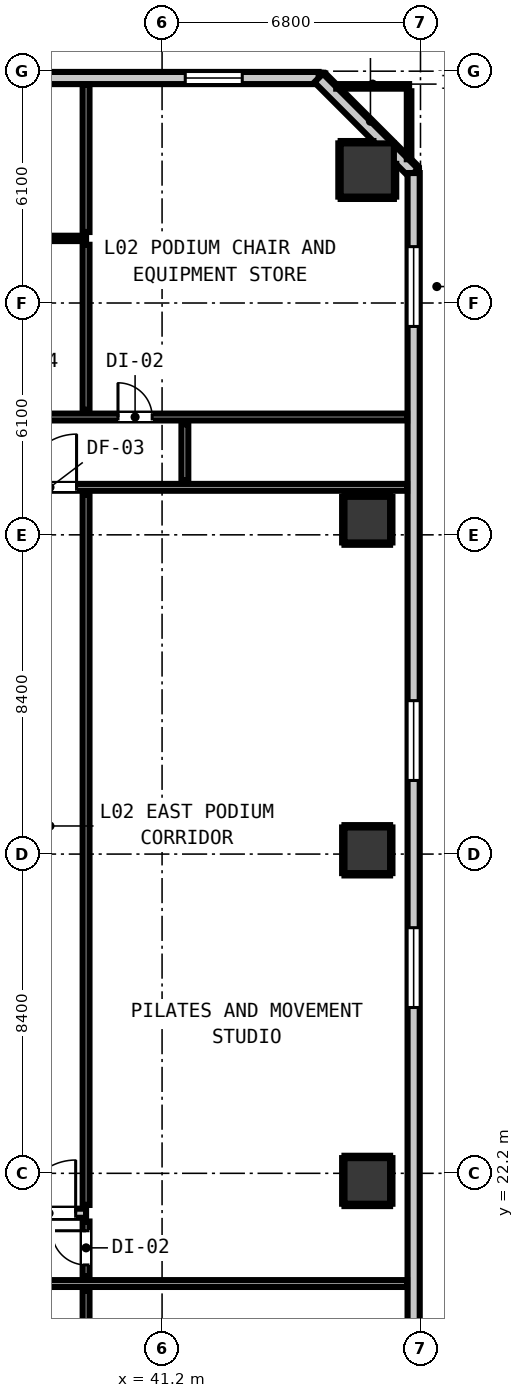
"""IFC4 building model, lengths in metres.
Left out: names, types, materials, properties, quantities, classifications, styles, units other than length and angle.
Written with IfcOpenShell. Run it as: python <this file> out.ifc"""

import sys

from ifc_helpers import new_model, si_unit, direction, frame, frame_2d, origin, origin_2d, place, context, subcontext, project, spatial, rectangle, circle, extrude, element, fill, save


model = new_model("IFC4")
c1 = context("Model", 3, precision=1e-05, world=origin(), true_north=direction((0.0, 1.0)))
c2 = subcontext(c1, "Body", "Model", "MODEL_VIEW")
j1 = project(units=[si_unit("LENGTHUNIT", "METRE"), si_unit("PLANEANGLEUNIT", "RADIAN")], contexts=[c1])
p1 = place(None, origin())
s1 = spatial("IfcSite", under=j1, at=p1, CompositionType="ELEMENT")
p2 = place(p1, origin())
s2 = spatial("IfcBuilding", under=s1, at=p2, CompositionType="ELEMENT")
p3 = place(p2, frame((0.0, 0.0, 9.4)))
s3 = spatial("IfcBuildingStorey", under=s2, at=p3, CompositionType="ELEMENT", Elevation=9.4)
for number, where, z_axis, x_axis in (
    (1, (46.6, 22.0, 0.0), (0.0, 0.0, 1.0), (1.0, 0.0, 0.0)),
    (2, (46.6, 30.7, 0.0), (0.0, 0.0, 1.0), (1.0, 0.0, 0.0)),
    (3, (46.6, 39.4, 0.0), (0.0, 0.0, 1.0), (1.0, 0.0, 0.0)),
):
    element("IfcColumn", number, at=place(p3, frame(where, z_axis=z_axis, x_axis=x_axis)), inside=s3, PredefinedType="COLUMN", context=c2, shape_type="SweptSolid", body=[
        extrude(circle(Radius=0.6, at=origin_2d()), origin(), (0.0, 0.0, 1.0), 4.2),
    ])
p4 = place(p3, frame((46.6, 48.6, 0.0), z_axis=(0.0, 0.0, 1.0), x_axis=(1.0, 0.0, 0.0)))
e4 = element("IfcColumn", 4, at=p4, inside=s3, PredefinedType="COLUMN", context=c2, shape_type="SweptSolid", body=[
    extrude(rectangle(XDim=1.4, YDim=1.4, at=origin_2d()), origin(), (0.0, 0.0, 1.0), 4.2),
])
p5 = place(p3, frame((6.68, 51.02, 0.0), z_axis=(0.0, 0.0, 1.0), x_axis=(1.0, 0.0, 0.0)))
e5 = element("IfcWall", 5, at=p5, inside=s3, PredefinedType="STANDARD", context=c2, shape_type="SweptSolid", body=[
    extrude(rectangle(XDim=38.64, YDim=0.32, at=frame_2d((19.32, 0.0))), origin(), (0.0, 0.0, 1.0), 3.92),
])
p6 = place(p5, frame((18.57, 0.0, 0.9)))
e6 = element("IfcOpeningElement", 6, at=p6, cuts=e5, PredefinedType="OPENING", context=c2, shape_type="SweptSolid", body=[
    extrude(rectangle(XDim=1.5, YDim=1.8, at=frame_2d((0.75, 0.9))), frame((0.0, 0.17, 0.0), z_axis=(0.0, -1.0, 0.0), x_axis=(1.0, 0.0, 0.0)), (0.0, 0.0, 1.0), 0.34),
])
p7 = place(p5, frame((24.09, 0.0, 0.9)))
e7 = element("IfcOpeningElement", 7, at=p7, cuts=e5, PredefinedType="OPENING", context=c2, shape_type="SweptSolid", body=[
    extrude(rectangle(XDim=1.5, YDim=1.8, at=frame_2d((0.75, 0.9))), frame((0.0, 0.17, 0.0), z_axis=(0.0, -1.0, 0.0), x_axis=(1.0, 0.0, 0.0)), (0.0, 0.0, 1.0), 0.34),
])
p8 = place(p5, frame((35.13, 0.0, 0.9)))
e8 = element("IfcOpeningElement", 8, at=p8, cuts=e5, PredefinedType="OPENING", context=c2, shape_type="SweptSolid", body=[
    extrude(rectangle(XDim=1.5, YDim=1.8, at=frame_2d((0.75, 0.9))), frame((0.0, 0.17, 0.0), z_axis=(0.0, -1.0, 0.0), x_axis=(1.0, 0.0, 0.0)), (0.0, 0.0, 1.0), 0.34),
])
p9 = place(p3, frame((45.32, 51.02, 0.0), z_axis=(0.0, 0.0, 1.0), x_axis=(0.707106781187, -0.707106781187, 0.0)))
e9 = element("IfcWall", 9, at=p9, inside=s3, PredefinedType="STANDARD", context=c2, shape_type="SweptSolid", body=[
    extrude(rectangle(XDim=3.536, YDim=0.32, at=frame_2d((1.768, 0.0))), origin(), (0.0, 0.0, 1.0), 3.92),
])
p10 = place(p3, frame((47.82, 48.52, 0.0), z_axis=(0.0, 0.0, 1.0), x_axis=(0.0, -1.0, 0.0)))
e10 = element("IfcWall", 10, at=p10, inside=s3, PredefinedType="STANDARD", context=c2, shape_type="SweptSolid", body=[
    extrude(rectangle(XDim=35.84, YDim=0.32, at=frame_2d((17.92, 0.0))), origin(), (0.0, 0.0, 1.0), 3.92),
])
p11 = place(p10, frame((1.937, 0.0, 0.9)))
e11 = element("IfcOpeningElement", 11, at=p11, cuts=e10, PredefinedType="OPENING", context=c2, shape_type="SweptSolid", body=[
    extrude(rectangle(XDim=2.1, YDim=1.9, at=frame_2d((1.05, 0.95))), frame((0.0, 0.17, 0.0), z_axis=(0.0, -1.0, 0.0), x_axis=(1.0, 0.0, 0.0)), (0.0, 0.0, 1.0), 0.34),
])
p12 = place(p10, frame((13.883, 0.0, 0.9)))
e12 = element("IfcOpeningElement", 12, at=p12, cuts=e10, PredefinedType="OPENING", context=c2, shape_type="SweptSolid", body=[
    extrude(rectangle(XDim=2.1, YDim=1.9, at=frame_2d((1.05, 0.95))), frame((0.0, 0.17, 0.0), z_axis=(0.0, -1.0, 0.0), x_axis=(1.0, 0.0, 0.0)), (0.0, 0.0, 1.0), 0.34),
])
p13 = place(p10, frame((19.857, 0.0, 0.9)))
e13 = element("IfcOpeningElement", 13, at=p13, cuts=e10, PredefinedType="OPENING", context=c2, shape_type="SweptSolid", body=[
    extrude(rectangle(XDim=2.1, YDim=1.9, at=frame_2d((1.05, 0.95))), frame((0.0, 0.17, 0.0), z_axis=(0.0, -1.0, 0.0), x_axis=(1.0, 0.0, 0.0)), (0.0, 0.0, 1.0), 0.34),
])
p14 = place(p10, frame((31.803, 0.0, 0.9)))
e14 = element("IfcOpeningElement", 14, at=p14, cuts=e10, PredefinedType="OPENING", context=c2, shape_type="SweptSolid", body=[
    extrude(rectangle(XDim=2.1, YDim=1.9, at=frame_2d((1.05, 0.95))), frame((0.0, 0.17, 0.0), z_axis=(0.0, -1.0, 0.0), x_axis=(1.0, 0.0, 0.0)), (0.0, 0.0, 1.0), 0.34),
])
p15 = place(p3, frame((10.5, 21.15, 0.0), z_axis=(0.0, 0.0, 1.0), x_axis=(1.0, 0.0, 0.0)))
e15 = element("IfcWall", 15, at=p15, inside=s3, PredefinedType="PARTITIONING", context=c2, shape_type="SweptSolid", body=[
    extrude(rectangle(XDim=28.7, YDim=0.24, at=frame_2d((14.35, 0.0))), origin(), (0.0, 0.0, 1.0), 3.92),
])
p16 = place(p15, frame((7.71, 0.0, 0.0)))
e16 = element("IfcOpeningElement", 16, at=p16, cuts=e15, PredefinedType="OPENING", context=c2, shape_type="SweptSolid", body=[
    extrude(rectangle(XDim=1.1, YDim=2.15, at=frame_2d((0.55, 1.075))), frame((0.0, 0.13, 0.0), z_axis=(0.0, -1.0, 0.0), x_axis=(1.0, 0.0, 0.0)), (0.0, 0.0, 1.0), 0.26),
])
p17 = place(p15, frame((0.324, 0.0, 0.0)))
e17 = element("IfcOpeningElement", 17, at=p17, cuts=e15, PredefinedType="OPENING", context=c2, shape_type="SweptSolid", body=[
    extrude(rectangle(XDim=1.4, YDim=2.15, at=frame_2d((0.7, 1.075))), frame((0.0, 0.13, 0.0), z_axis=(0.0, -1.0, 0.0), x_axis=(1.0, 0.0, 0.0)), (0.0, 0.0, 1.0), 0.26),
])
p18 = place(p15, frame((27.026, 0.0, 0.0)))
e18 = element("IfcOpeningElement", 18, at=p18, cuts=e15, PredefinedType="OPENING", context=c2, shape_type="SweptSolid", body=[
    extrude(rectangle(XDim=1.4, YDim=2.15, at=frame_2d((0.7, 1.075))), frame((0.0, 0.13, 0.0), z_axis=(0.0, -1.0, 0.0), x_axis=(1.0, 0.0, 0.0)), (0.0, 0.0, 1.0), 0.26),
])
p19 = place(p3, frame((4.352, 19.3, 0.0), z_axis=(0.0, 0.0, 1.0), x_axis=(1.0, 0.0, 0.0)))
e19 = element("IfcWall", 19, at=p19, inside=s3, PredefinedType="PARTITIONING", context=c2, shape_type="SweptSolid", body=[
    extrude(rectangle(XDim=43.296, YDim=0.18, at=frame_2d((21.648, 0.0))), origin(), (0.0, 0.0, 1.0), 3.92),
])
p20 = place(p19, frame((12.248, 0.0, 0.0)))
e20 = element("IfcOpeningElement", 20, at=p20, cuts=e19, PredefinedType="OPENING", context=c2, shape_type="SweptSolid", body=[
    extrude(rectangle(XDim=1.0, YDim=2.15, at=frame_2d((0.5, 1.075))), frame((0.0, 0.1, 0.0), z_axis=(0.0, -1.0, 0.0), x_axis=(1.0, 0.0, 0.0)), (0.0, 0.0, 1.0), 0.2),
])
p21 = place(p19, frame((27.998, 0.0, 0.0)))
e21 = element("IfcOpeningElement", 21, at=p21, cuts=e19, PredefinedType="OPENING", context=c2, shape_type="SweptSolid", body=[
    extrude(rectangle(XDim=1.0, YDim=2.15, at=frame_2d((0.5, 1.075))), frame((0.0, 0.1, 0.0), z_axis=(0.0, -1.0, 0.0), x_axis=(1.0, 0.0, 0.0)), (0.0, 0.0, 1.0), 0.2),
])
p22 = place(p3, frame((10.5, 40.25, 0.0), z_axis=(0.0, 0.0, 1.0), x_axis=(1.0, 0.0, 0.0)))
e22 = element("IfcWall", 22, at=p22, inside=s3, PredefinedType="PARTITIONING", context=c2, shape_type="SweptSolid", body=[
    extrude(rectangle(XDim=37.148, YDim=0.18, at=frame_2d((18.574, 0.0))), origin(), (0.0, 0.0, 1.0), 3.92),
])
p23 = place(p22, frame((6.935, 0.0, 0.0)))
e23 = element("IfcOpeningElement", 23, at=p23, cuts=e22, PredefinedType="OPENING", context=c2, shape_type="SweptSolid", body=[
    extrude(rectangle(XDim=1.4, YDim=2.15, at=frame_2d((0.7, 1.075))), frame((0.0, 0.1, 0.0), z_axis=(0.0, -1.0, 0.0), x_axis=(1.0, 0.0, 0.0)), (0.0, 0.0, 1.0), 0.2),
])
p24 = place(p22, frame((0.324, 0.0, 0.0)))
e24 = element("IfcOpeningElement", 24, at=p24, cuts=e22, PredefinedType="OPENING", context=c2, shape_type="SweptSolid", body=[
    extrude(rectangle(XDim=1.4, YDim=2.15, at=frame_2d((0.7, 1.075))), frame((0.0, 0.1, 0.0), z_axis=(0.0, -1.0, 0.0), x_axis=(1.0, 0.0, 0.0)), (0.0, 0.0, 1.0), 0.2),
])
p25 = place(p22, frame((27.05, 0.0, 0.0)))
e25 = element("IfcOpeningElement", 25, at=p25, cuts=e22, PredefinedType="OPENING", context=c2, shape_type="SweptSolid", body=[
    extrude(rectangle(XDim=1.4, YDim=2.15, at=frame_2d((0.7, 1.075))), frame((0.0, 0.1, 0.0), z_axis=(0.0, -1.0, 0.0), x_axis=(1.0, 0.0, 0.0)), (0.0, 0.0, 1.0), 0.2),
])
p26 = place(p3, frame((4.352, 42.1, 0.0), z_axis=(0.0, 0.0, 1.0), x_axis=(1.0, 0.0, 0.0)))
e26 = element("IfcWall", 26, at=p26, inside=s3, PredefinedType="PARTITIONING", context=c2, shape_type="SweptSolid", body=[
    extrude(rectangle(XDim=43.296, YDim=0.18, at=frame_2d((21.648, 0.0))), origin(), (0.0, 0.0, 1.0), 3.92),
])
p27 = place(p26, frame((14.472, 0.0, 0.0)))
e27 = element("IfcOpeningElement", 27, at=p27, cuts=e26, PredefinedType="OPENING", context=c2, shape_type="SweptSolid", body=[
    extrude(rectangle(XDim=0.9, YDim=2.1, at=frame_2d((0.45, 1.05))), frame((0.0, 0.1, 0.0), z_axis=(0.0, -1.0, 0.0), x_axis=(1.0, 0.0, 0.0)), (0.0, 0.0, 1.0), 0.2),
])
p28 = place(p26, frame((25.118, 0.0, 0.0)))
e28 = element("IfcOpeningElement", 28, at=p28, cuts=e26, PredefinedType="OPENING", context=c2, shape_type="SweptSolid", body=[
    extrude(rectangle(XDim=0.86, YDim=2.02, at=frame_2d((0.43, 1.01))), frame((0.0, 0.1, 0.0), z_axis=(0.0, -1.0, 0.0), x_axis=(1.0, 0.0, 0.0)), (0.0, 0.0, 1.0), 0.2),
])
p29 = place(p26, frame((29.218, 0.0, 0.0)))
e29 = element("IfcOpeningElement", 29, at=p29, cuts=e26, PredefinedType="OPENING", context=c2, shape_type="SweptSolid", body=[
    extrude(rectangle(XDim=0.86, YDim=2.02, at=frame_2d((0.43, 1.01))), frame((0.0, 0.1, 0.0), z_axis=(0.0, -1.0, 0.0), x_axis=(1.0, 0.0, 0.0)), (0.0, 0.0, 1.0), 0.2),
])
p30 = place(p26, frame((32.873, 0.0, 0.0)))
e30 = element("IfcOpeningElement", 30, at=p30, cuts=e26, PredefinedType="OPENING", context=c2, shape_type="SweptSolid", body=[
    extrude(rectangle(XDim=0.95, YDim=2.1, at=frame_2d((0.475, 1.05))), frame((0.0, 0.1, 0.0), z_axis=(0.0, -1.0, 0.0), x_axis=(1.0, 0.0, 0.0)), (0.0, 0.0, 1.0), 0.2),
])
p31 = place(p26, frame((35.688, 0.0, 0.0)))
e31 = element("IfcOpeningElement", 31, at=p31, cuts=e26, PredefinedType="OPENING", context=c2, shape_type="SweptSolid", body=[
    extrude(rectangle(XDim=0.9, YDim=2.1, at=frame_2d((0.45, 1.05))), frame((0.0, 0.1, 0.0), z_axis=(0.0, -1.0, 0.0), x_axis=(1.0, 0.0, 0.0)), (0.0, 0.0, 1.0), 0.2),
])
p32 = place(p3, frame((28.0, 46.8, 0.0), z_axis=(0.0, 0.0, 1.0), x_axis=(1.0, 0.0, 0.0)))
e32 = element("IfcWall", 32, at=p32, inside=s3, PredefinedType="PARTITIONING", context=c2, shape_type="SweptSolid", body=[
    extrude(rectangle(XDim=11.2, YDim=0.14, at=frame_2d((5.6, 0.0))), origin(), (0.0, 0.0, 1.0), 3.92),
])
p33 = place(p3, frame((45.783, 50.8, 0.0), z_axis=(0.0, 0.0, 1.0), x_axis=(1.0, 0.0, 0.0)))
e33 = element("IfcWall", 33, at=p33, inside=s3, PredefinedType="PARTITIONING", context=c2, shape_type="SweptSolid", body=[
    extrude(rectangle(XDim=1.917, YDim=0.12, at=frame_2d((0.958, 0.0))), origin(), (0.0, 0.0, 1.0), 3.92),
])
p34 = place(p3, frame((39.2, 12.258, 0.0), z_axis=(0.0, 0.0, 1.0), x_axis=(0.0, 1.0, 0.0)))
e34 = element("IfcWall", 34, at=p34, inside=s3, PredefinedType="PARTITIONING", context=c2, shape_type="SweptSolid", body=[
    extrude(rectangle(XDim=6.854, YDim=0.18, at=frame_2d((3.427, 0.0))), origin(), (0.0, 0.0, 1.0), 3.92),
])
p35 = place(p3, frame((39.2, 19.488, 0.0), z_axis=(0.0, 0.0, 1.0), x_axis=(0.0, 1.0, 0.0)))
e35 = element("IfcWall", 35, at=p35, inside=s3, PredefinedType="PARTITIONING", context=c2, shape_type="SweptSolid", body=[
    extrude(rectangle(XDim=1.444, YDim=0.18, at=frame_2d((0.722, 0.0))), origin(), (0.0, 0.0, 1.0), 3.92),
])
p36 = place(p35, frame((0.301, 0.0, 0.0)))
e36 = element("IfcOpeningElement", 36, at=p36, cuts=e35, PredefinedType="OPENING", context=c2, shape_type="SweptSolid", body=[
    extrude(rectangle(XDim=0.9, YDim=2.1, at=frame_2d((0.45, 1.05))), frame((0.0, 0.1, 0.0), z_axis=(0.0, -1.0, 0.0), x_axis=(1.0, 0.0, 0.0)), (0.0, 0.0, 1.0), 0.2),
])
p37 = place(p3, frame((39.2, 21.368, 0.0), z_axis=(0.0, 0.0, 1.0), x_axis=(0.0, 1.0, 0.0)))
e37 = element("IfcWall", 37, at=p37, inside=s3, PredefinedType="PARTITIONING", context=c2, shape_type="SweptSolid", body=[
    extrude(rectangle(XDim=18.694, YDim=0.18, at=frame_2d((9.347, 0.0))), origin(), (0.0, 0.0, 1.0), 3.92),
])
p38 = place(p3, frame((39.2, 42.288, 0.0), z_axis=(0.0, 0.0, 1.0), x_axis=(0.0, 1.0, 0.0)))
e38 = element("IfcWall", 38, at=p38, inside=s3, PredefinedType="PARTITIONING", context=c2, shape_type="SweptSolid", body=[
    extrude(rectangle(XDim=4.344, YDim=0.18, at=frame_2d((2.172, 0.0))), origin(), (0.0, 0.0, 1.0), 3.92),
])
p39 = place(p3, frame((39.2, 46.968, 0.0), z_axis=(0.0, 0.0, 1.0), x_axis=(0.0, 1.0, 0.0)))
e39 = element("IfcWall", 39, at=p39, inside=s3, PredefinedType="PARTITIONING", context=c2, shape_type="SweptSolid", body=[
    extrude(rectangle(XDim=3.88, YDim=0.18, at=frame_2d((1.94, 0.0))), origin(), (0.0, 0.0, 1.0), 3.92),
])
p40 = place(p3, frame((41.8, 40.438, 0.0), z_axis=(0.0, 0.0, 1.0), x_axis=(0.0, 1.0, 0.0)))
e40 = element("IfcWall", 40, at=p40, inside=s3, PredefinedType="PARTITIONING", context=c2, shape_type="SweptSolid", body=[
    extrude(rectangle(XDim=1.474, YDim=0.18, at=frame_2d((0.737, 0.0))), origin(), (0.0, 0.0, 1.0), 3.92),
])
p41 = place(p3, frame((47.7, 48.883, 0.0), z_axis=(0.0, 0.0, 1.0), x_axis=(0.0, 1.0, 0.0)))
e41 = element("IfcWall", 41, at=p41, inside=s3, PredefinedType="PARTITIONING", context=c2, shape_type="SweptSolid", body=[
    extrude(rectangle(XDim=1.789, YDim=0.12, at=frame_2d((0.895, 0.0))), origin(), (0.0, 0.0, 1.0), 3.92),
])
for number, where, z_axis, x_axis in (
    (42, (46.0, 21.368, 0.0), (0.0, 0.0, 1.0), (1.0, 0.0, 0.0)),
    (43, (46.0, 22.632, 0.0), (0.0, 0.0, 1.0), (1.0, 0.0, 0.0)),
):
    element("IfcWall", number, at=place(p3, frame(where, z_axis=z_axis, x_axis=x_axis)), inside=s3, PredefinedType="PARTITIONING", context=c2, shape_type="SweptSolid", body=[
        extrude(rectangle(XDim=1.2, YDim=0.06, at=frame_2d((0.6, 0.0))), origin(), (0.0, 0.0, 1.0), 1.45),
    ])
for number, where, z_axis, x_axis in (
    (44, (45.968, 21.4, 0.0), (0.0, 0.0, 1.0), (0.0, 1.0, 0.0)),
    (45, (47.232, 21.4, 0.0), (0.0, 0.0, 1.0), (0.0, 1.0, 0.0)),
):
    element("IfcWall", number, at=place(p3, frame(where, z_axis=z_axis, x_axis=x_axis)), inside=s3, PredefinedType="PARTITIONING", context=c2, shape_type="SweptSolid", body=[
        extrude(rectangle(XDim=1.2, YDim=0.06, at=frame_2d((0.6, 0.0))), origin(), (0.0, 0.0, 1.0), 1.45),
    ])
for number, where, z_axis, x_axis in (
    (46, (46.0, 30.068, 0.0), (0.0, 0.0, 1.0), (1.0, 0.0, 0.0)),
    (47, (46.0, 31.332, 0.0), (0.0, 0.0, 1.0), (1.0, 0.0, 0.0)),
    (48, (45.968, 30.1, 0.0), (0.0, 0.0, 1.0), (0.0, 1.0, 0.0)),
    (49, (47.232, 30.1, 0.0), (0.0, 0.0, 1.0), (0.0, 1.0, 0.0)),
    (50, (46.0, 38.768, 0.0), (0.0, 0.0, 1.0), (1.0, 0.0, 0.0)),
    (51, (46.0, 40.032, 0.0), (0.0, 0.0, 1.0), (1.0, 0.0, 0.0)),
    (52, (45.968, 38.8, 0.0), (0.0, 0.0, 1.0), (0.0, 1.0, 0.0)),
    (53, (47.232, 38.8, 0.0), (0.0, 0.0, 1.0), (0.0, 1.0, 0.0)),
):
    element("IfcWall", number, at=place(p3, frame(where, z_axis=z_axis, x_axis=x_axis)), inside=s3, PredefinedType="PARTITIONING", context=c2, shape_type="SweptSolid", body=[
        extrude(rectangle(XDim=1.2, YDim=0.06, at=frame_2d((0.6, 0.0))), origin(), (0.0, 0.0, 1.0), 1.45),
    ])
p42 = place(p3, frame((45.9, 47.868, 0.0), z_axis=(0.0, 0.0, 1.0), x_axis=(1.0, 0.0, 0.0)))
e54 = element("IfcWall", 54, at=p42, inside=s3, PredefinedType="PARTITIONING", context=c2, shape_type="SweptSolid", body=[
    extrude(rectangle(XDim=1.4, YDim=0.06, at=frame_2d((0.7, 0.0))), origin(), (0.0, 0.0, 1.0), 1.45),
])
p43 = place(p3, frame((45.9, 49.332, 0.0), z_axis=(0.0, 0.0, 1.0), x_axis=(1.0, 0.0, 0.0)))
e55 = element("IfcWall", 55, at=p43, inside=s3, PredefinedType="PARTITIONING", context=c2, shape_type="SweptSolid", body=[
    extrude(rectangle(XDim=0.861, YDim=0.06, at=frame_2d((0.431, 0.0))), origin(), (0.0, 0.0, 1.0), 1.45),
])
p44 = place(p3, frame((45.868, 47.9, 0.0), z_axis=(0.0, 0.0, 1.0), x_axis=(0.0, 1.0, 0.0)))
e56 = element("IfcWall", 56, at=p44, inside=s3, PredefinedType="PARTITIONING", context=c2, shape_type="SweptSolid", body=[
    extrude(rectangle(XDim=1.4, YDim=0.06, at=frame_2d((0.7, 0.0))), origin(), (0.0, 0.0, 1.0), 1.45),
])
p45 = place(p3, frame((47.332, 47.9, 0.0), z_axis=(0.0, 0.0, 1.0), x_axis=(0.0, 1.0, 0.0)))
e57 = element("IfcWall", 57, at=p45, inside=s3, PredefinedType="PARTITIONING", context=c2, shape_type="SweptSolid", body=[
    extrude(rectangle(XDim=0.861, YDim=0.06, at=frame_2d((0.431, 0.0))), origin(), (0.0, 0.0, 1.0), 1.45),
])
p46 = place(p8, origin())
e58 = element("IfcWindow", 58, at=p46, inside=s3, PartitioningType="SINGLE_PANEL", PredefinedType="WINDOW", context=c2, shape_type="SweptSolid", body=[
    extrude(rectangle(XDim=1.5, YDim=1.8, at=frame_2d((0.75, 0.9))), frame((0.0, 0.03, 0.0), z_axis=(0.0, -1.0, 0.0), x_axis=(1.0, 0.0, 0.0)), (0.0, 0.0, 1.0), 0.06),
])
fill(e8, e58)
p47 = place(p11, origin())
e59 = element("IfcWindow", 59, at=p47, inside=s3, PartitioningType="SINGLE_PANEL", PredefinedType="WINDOW", context=c2, shape_type="SweptSolid", body=[
    extrude(rectangle(XDim=2.1, YDim=1.9, at=frame_2d((1.05, 0.95))), frame((0.0, 0.03, 0.0), z_axis=(0.0, -1.0, 0.0), x_axis=(1.0, 0.0, 0.0)), (0.0, 0.0, 1.0), 0.06),
])
fill(e11, e59)
p48 = place(p12, origin())
e60 = element("IfcWindow", 60, at=p48, inside=s3, PartitioningType="SINGLE_PANEL", PredefinedType="WINDOW", context=c2, shape_type="SweptSolid", body=[
    extrude(rectangle(XDim=2.1, YDim=1.9, at=frame_2d((1.05, 0.95))), frame((0.0, 0.03, 0.0), z_axis=(0.0, -1.0, 0.0), x_axis=(1.0, 0.0, 0.0)), (0.0, 0.0, 1.0), 0.06),
])
fill(e12, e60)
p49 = place(p13, origin())
e61 = element("IfcWindow", 61, at=p49, inside=s3, PartitioningType="SINGLE_PANEL", PredefinedType="WINDOW", context=c2, shape_type="SweptSolid", body=[
    extrude(rectangle(XDim=2.1, YDim=1.9, at=frame_2d((1.05, 0.95))), frame((0.0, 0.03, 0.0), z_axis=(0.0, -1.0, 0.0), x_axis=(1.0, 0.0, 0.0)), (0.0, 0.0, 1.0), 0.06),
])
fill(e13, e61)
p50 = place(p18, origin())
e62 = element("IfcDoor", 62, at=p50, inside=s3, OperationType="SINGLE_SWING_RIGHT", PredefinedType="DOOR", context=c2, shape_type="SweptSolid", body=[
    extrude(rectangle(XDim=1.4, YDim=2.15, at=frame_2d((0.7, 1.075))), frame((0.0, 0.025, 0.0), z_axis=(0.0, -1.0, 0.0), x_axis=(1.0, 0.0, 0.0)), (0.0, 0.0, 1.0), 0.05),
])
fill(e18, e62)
p51 = place(p25, origin())
e63 = element("IfcDoor", 63, at=p51, inside=s3, OperationType="SINGLE_SWING_RIGHT", PredefinedType="DOOR", context=c2, shape_type="SweptSolid", body=[
    extrude(rectangle(XDim=1.4, YDim=2.15, at=frame_2d((0.7, 1.075))), frame((0.0, 0.025, 0.0), z_axis=(0.0, -1.0, 0.0), x_axis=(1.0, 0.0, 0.0)), (0.0, 0.0, 1.0), 0.05),
])
fill(e25, e63)
p52 = place(p36, origin())
e64 = element("IfcDoor", 64, at=p52, inside=s3, OperationType="SINGLE_SWING_RIGHT", PredefinedType="DOOR", context=c2, shape_type="SweptSolid", body=[
    extrude(rectangle(XDim=0.9, YDim=2.1, at=frame_2d((0.45, 1.05))), frame((0.0, 0.025, 0.0), z_axis=(0.0, -1.0, 0.0), x_axis=(1.0, 0.0, 0.0)), (0.0, 0.0, 1.0), 0.05),
])
fill(e36, e64)
p53 = place(p31, origin())
e65 = element("IfcDoor", 65, at=p53, inside=s3, OperationType="SINGLE_SWING_LEFT", PredefinedType="DOOR", context=c2, shape_type="SweptSolid", body=[
    extrude(rectangle(XDim=0.9, YDim=2.1, at=frame_2d((0.45, 1.05))), frame((0.0, 0.025, 0.0), z_axis=(0.0, -1.0, 0.0), x_axis=(1.0, 0.0, 0.0)), (0.0, 0.0, 1.0), 0.05),
])
fill(e31, e65)
save(model, sys.argv[1])
